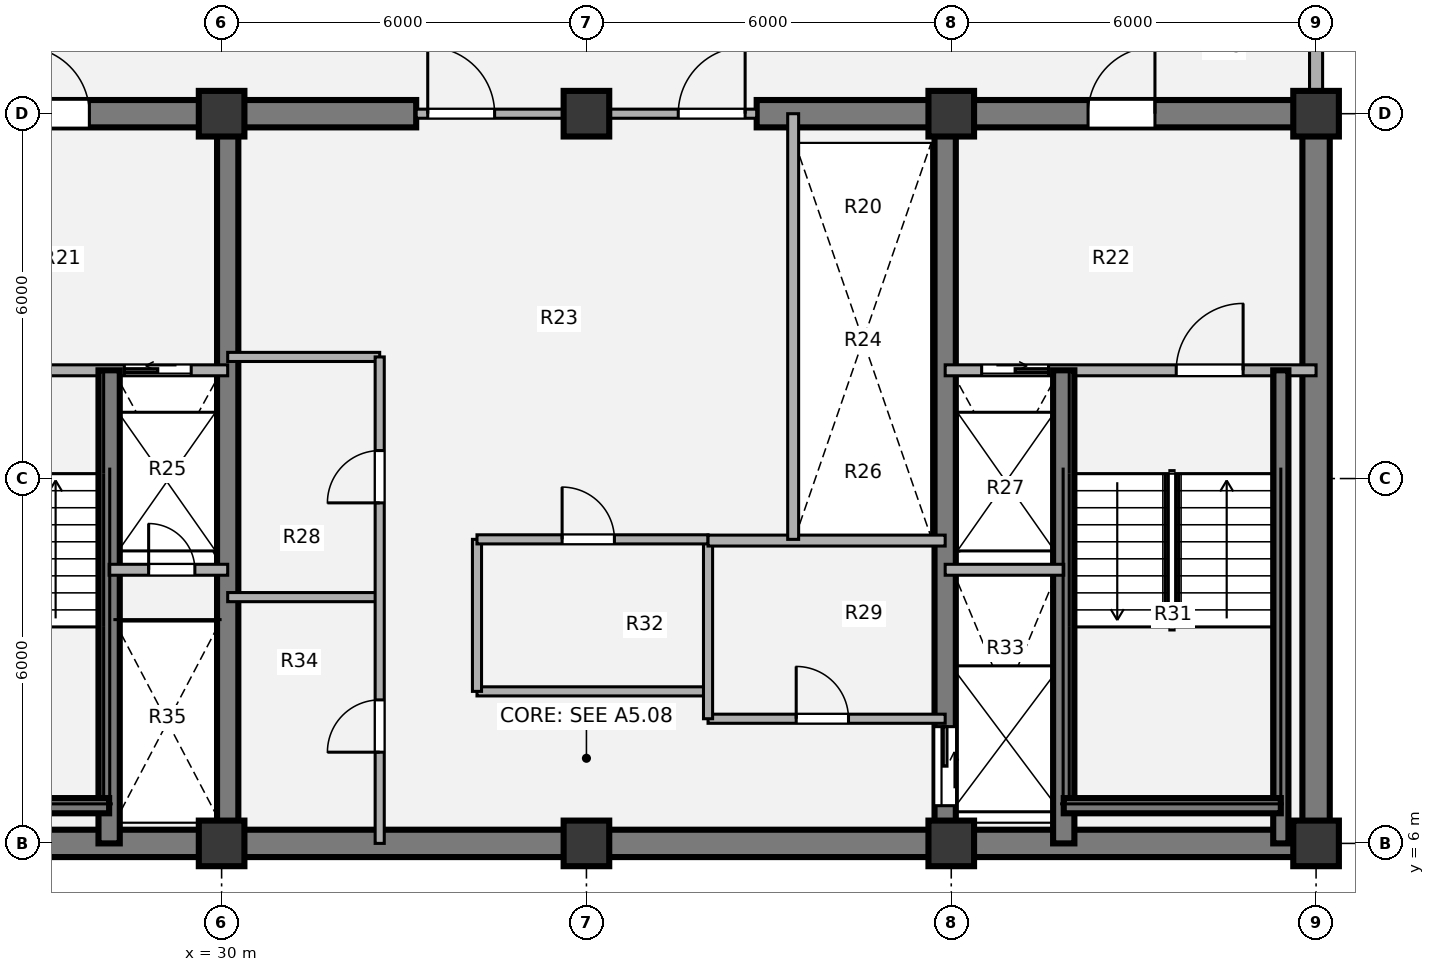
"""IFC4 building model, lengths in metres.
Left out: names, types, materials, properties, quantities, classifications, styles, units other than length and angle.
Written with IfcOpenShell. Run it as: python <this file> out.ifc"""

import sys

from ifc_helpers import new_model, si_unit, direction, frame, frame_2d, origin, origin_2d, place, context, subcontext, project, spatial, rectangle, extrude, source, transform, mapped, element, fill, save


model = new_model("IFC4")
c1 = context("Model", 3, precision=1e-05, world=origin(), true_north=direction((0.0, 1.0)))
c2 = subcontext(c1, "Body", "Model", "MODEL_VIEW")
j1 = project(units=[si_unit("LENGTHUNIT", "METRE"), si_unit("PLANEANGLEUNIT", "RADIAN")], contexts=[c1])
p1 = place(None, origin())
s1 = spatial("IfcSite", under=j1, at=p1, CompositionType="ELEMENT")
p2 = place(p1, origin())
s2 = spatial("IfcBuilding", under=s1, at=p2, CompositionType="ELEMENT")
p3 = place(p2, frame((0.0, 0.0, 182.88)))
s3 = spatial("IfcBuildingStorey", under=s2, at=p3, CompositionType="ELEMENT", Elevation=182.88)
m1 = source(origin(), c2, "Body", "SweptSolid", [
    extrude(rectangle(XDim=0.75, YDim=0.75, at=origin_2d()), origin(), (0.0, 0.0, 1.0), 3.78),
])
for number, where, z_axis, x_axis in (
    (1, (30.0, 6.0, 0.0), (0.0, 0.0, 1.0), (1.0, 0.0, 0.0)),
    (2, (36.0, 6.0, 0.0), (0.0, 0.0, 1.0), (1.0, 0.0, 0.0)),
    (3, (42.0, 6.0, 0.0), (0.0, 0.0, 1.0), (1.0, 0.0, 0.0)),
    (4, (48.0, 6.0, 0.0), (0.0, 0.0, 1.0), (1.0, 0.0, 0.0)),
    (5, (30.0, 18.0, 0.0), (0.0, 0.0, 1.0), (1.0, 0.0, 0.0)),
    (6, (36.0, 18.0, 0.0), (0.0, 0.0, 1.0), (1.0, 0.0, 0.0)),
    (7, (42.0, 18.0, 0.0), (0.0, 0.0, 1.0), (1.0, 0.0, 0.0)),
    (8, (48.0, 18.0, 0.0), (0.0, 0.0, 1.0), (1.0, 0.0, 0.0)),
):
    element("IfcColumn", number, at=place(p3, frame(where, z_axis=z_axis, x_axis=x_axis)), inside=s3, PredefinedType="COLUMN", context=c2, shape_type="MappedRepresentation", body=[
        mapped(m1, transform((0.0, 0.0, 0.0), x_axis=(1.0, 0.0, 0.0), y_axis=(0.0, 1.0, 0.0), z_axis=(0.0, 0.0, 1.0), scale=1.0)),
    ])
p4 = place(p3, frame((48.225, 6.0, 0.0), z_axis=(0.0, 0.0, 1.0), x_axis=(-1.0, 0.0, 0.0)))
e9 = element("IfcWall", 9, at=p4, inside=s3, PredefinedType="SHEAR", context=c2, shape_type="SweptSolid", body=[
    extrude(rectangle(XDim=24.45, YDim=0.45, at=frame_2d((12.225, 0.0))), origin(), (0.0, 0.0, 1.0), 3.78),
])
p5 = place(p3, frame((48.0, 18.0, 0.0), z_axis=(0.0, 0.0, 1.0), x_axis=(0.0, -1.0, 0.0)))
e10 = element("IfcWall", 10, at=p5, inside=s3, PredefinedType="SHEAR", context=c2, shape_type="SweptSolid", body=[
    extrude(rectangle(XDim=12.0, YDim=0.45, at=frame_2d((6.0, 0.0))), origin(), (0.0, 0.0, 1.0), 3.78),
])
p6 = place(p3, frame((23.775, 18.0, 0.0), z_axis=(0.0, 0.0, 1.0), x_axis=(1.0, 0.0, 0.0)))
e11 = element("IfcWall", 11, at=p6, inside=s3, PredefinedType="SHEAR", context=c2, shape_type="SweptSolid", body=[
    extrude(rectangle(XDim=9.425, YDim=0.45, at=frame_2d((4.712, 0.0))), origin(), (0.0, 0.0, 1.0), 3.78),
])
p7 = place(p6, frame((2.95, 0.0, 0.0)))
e12 = element("IfcOpeningElement", 12, at=p7, cuts=e11, PredefinedType="OPENING", context=c2, shape_type="SweptSolid", body=[
    extrude(rectangle(XDim=1.1, YDim=2.1, at=origin_2d()), frame((0.55, 0.235, 1.05), z_axis=(0.0, -1.0, 0.0), x_axis=(1.0, 0.0, 0.0)), (0.0, 0.0, 1.0), 0.47),
])
p8 = place(p3, frame((38.8, 18.0, 0.0), z_axis=(0.0, 0.0, 1.0), x_axis=(1.0, 0.0, 0.0)))
e13 = element("IfcWall", 13, at=p8, inside=s3, PredefinedType="SHEAR", context=c2, shape_type="SweptSolid", body=[
    extrude(rectangle(XDim=9.425, YDim=0.45, at=frame_2d((4.712, 0.0))), origin(), (0.0, 0.0, 1.0), 3.78),
])
p9 = place(p8, frame((5.45, 0.0, 0.0)))
e14 = element("IfcOpeningElement", 14, at=p9, cuts=e13, PredefinedType="OPENING", context=c2, shape_type="SweptSolid", body=[
    extrude(rectangle(XDim=1.1, YDim=2.1, at=origin_2d()), frame((0.55, 0.235, 1.05), z_axis=(0.0, -1.0, 0.0), x_axis=(1.0, 0.0, 0.0)), (0.0, 0.0, 1.0), 0.47),
])
p10 = place(p3, frame((30.1, 6.0, 0.0), z_axis=(0.0, 0.0, 1.0), x_axis=(0.0, 1.0, 0.0)))
e15 = element("IfcWall", 15, at=p10, inside=s3, PredefinedType="SHEAR", context=c2, shape_type="SweptSolid", body=[
    extrude(rectangle(XDim=12.0, YDim=0.35, at=frame_2d((6.0, 0.0))), origin(), (0.0, 0.0, 1.0), 3.78),
])
p11 = place(p3, frame((41.9, 18.0, 0.0), z_axis=(0.0, 0.0, 1.0), x_axis=(0.0, -1.0, 0.0)))
e16 = element("IfcWall", 16, at=p11, inside=s3, PredefinedType="SHEAR", context=c2, shape_type="SweptSolid", body=[
    extrude(rectangle(XDim=12.0, YDim=0.35, at=frame_2d((6.0, 0.0))), origin(), (0.0, 0.0, 1.0), 3.78),
])
p12 = place(p11, frame((10.08, 0.0, 0.0)))
e17 = element("IfcOpeningElement", 17, at=p12, cuts=e16, PredefinedType="OPENING", context=c2, shape_type="SweptSolid", body=[
    extrude(rectangle(XDim=1.3, YDim=2.1, at=origin_2d()), frame((0.65, 0.185, 1.05), z_axis=(0.0, -1.0, 0.0), x_axis=(1.0, 0.0, 0.0)), (0.0, 0.0, 1.0), 0.37),
])
p13 = place(p3, frame((48.0, 21.05, 0.0), z_axis=(0.0, 0.0, 1.0), x_axis=(0.0, -1.0, 0.0)))
e18 = element("IfcWall", 18, at=p13, inside=s3, PredefinedType="SOLIDWALL", context=c2, shape_type="SweptSolid", body=[
    extrude(rectangle(XDim=2.695, YDim=0.215, at=frame_2d((1.348, 0.0))), origin(), (0.0, 0.0, 1.0), 2.718),
])
p14 = place(p3, frame((30.1, 14.0, 0.0), z_axis=(0.0, 0.0, 1.0), x_axis=(1.0, 0.0, 0.0)))
e19 = element("IfcWall", 19, at=p14, inside=s3, PredefinedType="PARTITIONING", context=c2, shape_type="SweptSolid", body=[
    extrude(rectangle(XDim=2.5, YDim=0.15, at=frame_2d((1.25, 0.0))), origin(), (0.0, 0.0, 1.0), 3.5),
])
p15 = place(p3, frame((34.2, 8.5, 0.0), z_axis=(0.0, 0.0, 1.0), x_axis=(1.0, 0.0, 0.0)))
e20 = element("IfcWall", 20, at=p15, inside=s3, PredefinedType="PARTITIONING", context=c2, shape_type="SweptSolid", body=[
    extrude(rectangle(XDim=3.8, YDim=0.15, at=frame_2d((1.9, 0.0))), origin(), (0.0, 0.0, 1.0), 3.5),
])
p16 = place(p3, frame((38.0, 8.05, 0.0), z_axis=(0.0, 0.0, 1.0), x_axis=(1.0, 0.0, 0.0)))
e21 = element("IfcWall", 21, at=p16, inside=s3, PredefinedType="PARTITIONING", context=c2, shape_type="SweptSolid", body=[
    extrude(rectangle(XDim=3.9, YDim=0.15, at=frame_2d((1.95, 0.0))), origin(), (0.0, 0.0, 1.0), 3.5),
])
p17 = place(p16, frame((1.45, 0.0, 0.0)))
e22 = element("IfcOpeningElement", 22, at=p17, cuts=e21, PredefinedType="OPENING", context=c2, shape_type="SweptSolid", body=[
    extrude(rectangle(XDim=0.86, YDim=2.1, at=origin_2d()), frame((0.43, 0.085, 1.05), z_axis=(0.0, -1.0, 0.0), x_axis=(1.0, 0.0, 0.0)), (0.0, 0.0, 1.0), 0.17),
])
p18 = place(p3, frame((34.2, 8.5, 0.0), z_axis=(0.0, 0.0, 1.0), x_axis=(0.0, 1.0, 0.0)))
e23 = element("IfcWall", 23, at=p18, inside=s3, PredefinedType="PARTITIONING", context=c2, shape_type="SweptSolid", body=[
    extrude(rectangle(XDim=2.5, YDim=0.15, at=frame_2d((1.25, 0.0))), origin(), (0.0, 0.0, 1.0), 3.5),
])
p19 = place(p3, frame((38.0, 8.05, 0.0), z_axis=(0.0, 0.0, 1.0), x_axis=(0.0, 1.0, 0.0)))
e24 = element("IfcWall", 24, at=p19, inside=s3, PredefinedType="PARTITIONING", context=c2, shape_type="SweptSolid", body=[
    extrude(rectangle(XDim=2.95, YDim=0.15, at=frame_2d((1.475, 0.0))), origin(), (0.0, 0.0, 1.0), 3.5),
])
p20 = place(p3, frame((34.2, 11.0, 0.0), z_axis=(0.0, 0.0, 1.0), x_axis=(1.0, 0.0, 0.0)))
e25 = element("IfcWall", 25, at=p20, inside=s3, PredefinedType="PARTITIONING", context=c2, shape_type="SweptSolid", body=[
    extrude(rectangle(XDim=3.8, YDim=0.15, at=frame_2d((1.9, 0.0))), origin(), (0.0, 0.0, 1.0), 3.5),
])
p21 = place(p20, frame((1.4, 0.0, 0.0)))
e26 = element("IfcOpeningElement", 26, at=p21, cuts=e25, PredefinedType="OPENING", context=c2, shape_type="SweptSolid", body=[
    extrude(rectangle(XDim=0.86, YDim=2.1, at=origin_2d()), frame((0.43, 0.085, 1.05), z_axis=(0.0, -1.0, 0.0), x_axis=(1.0, 0.0, 0.0)), (0.0, 0.0, 1.0), 0.17),
])
p22 = place(p3, frame((38.0, 10.98, 0.0), z_axis=(0.0, 0.0, 1.0), x_axis=(1.0, 0.0, 0.0)))
e27 = element("IfcWall", 27, at=p22, inside=s3, PredefinedType="PARTITIONING", context=c2, shape_type="SweptSolid", body=[
    extrude(rectangle(XDim=3.9, YDim=0.18, at=frame_2d((1.95, 0.0))), origin(), (0.0, 0.0, 1.0), 3.5),
])
p23 = place(p3, frame((39.4, 11.0, 0.0), z_axis=(0.0, 0.0, 1.0), x_axis=(0.0, 1.0, 0.0)))
e28 = element("IfcWall", 28, at=p23, inside=s3, PredefinedType="PARTITIONING", context=c2, shape_type="SweptSolid", body=[
    extrude(rectangle(XDim=7.0, YDim=0.18, at=frame_2d((3.5, 0.0))), origin(), (0.0, 0.0, 1.0), 3.5),
])
p24 = place(p3, frame((30.1, 10.05, 0.0), z_axis=(0.0, 0.0, 1.0), x_axis=(1.0, 0.0, 0.0)))
e29 = element("IfcWall", 29, at=p24, inside=s3, PredefinedType="PARTITIONING", context=c2, shape_type="SweptSolid", body=[
    extrude(rectangle(XDim=2.5, YDim=0.15, at=frame_2d((1.25, 0.0))), origin(), (0.0, 0.0, 1.0), 3.5),
])
p25 = place(p3, frame((32.6, 6.0, 0.0), z_axis=(0.0, 0.0, 1.0), x_axis=(0.0, 1.0, 0.0)))
e30 = element("IfcWall", 30, at=p25, inside=s3, PredefinedType="PARTITIONING", context=c2, shape_type="SweptSolid", body=[
    extrude(rectangle(XDim=8.0, YDim=0.15, at=frame_2d((4.0, 0.0))), origin(), (0.0, 0.0, 1.0), 3.5),
])
p26 = place(p25, frame((1.5, 0.0, 0.0)))
e31 = element("IfcOpeningElement", 31, at=p26, cuts=e30, PredefinedType="OPENING", context=c2, shape_type="SweptSolid", body=[
    extrude(rectangle(XDim=0.86, YDim=2.1, at=origin_2d()), frame((0.43, 0.085, 1.05), z_axis=(0.0, -1.0, 0.0), x_axis=(1.0, 0.0, 0.0)), (0.0, 0.0, 1.0), 0.17),
])
p27 = place(p25, frame((5.6, 0.0, 0.0)))
e32 = element("IfcOpeningElement", 32, at=p27, cuts=e30, PredefinedType="OPENING", context=c2, shape_type="SweptSolid", body=[
    extrude(rectangle(XDim=0.86, YDim=2.1, at=origin_2d()), frame((0.43, 0.085, 1.05), z_axis=(0.0, -1.0, 0.0), x_axis=(1.0, 0.0, 0.0)), (0.0, 0.0, 1.0), 0.17),
])
p28 = place(p3, frame((33.2, 18.0, 0.0), z_axis=(0.0, 0.0, 1.0), x_axis=(1.0, 0.0, 0.0)))
e33 = element("IfcWall", 33, at=p28, inside=s3, PredefinedType="PARTITIONING", context=c2, shape_type="SweptSolid", body=[
    extrude(rectangle(XDim=5.6, YDim=0.15, at=frame_2d((2.8, 0.0))), origin(), (0.0, 0.0, 1.0), 2.515),
])
p29 = place(p28, frame((0.19, 0.0, 0.0)))
e34 = element("IfcOpeningElement", 34, at=p29, cuts=e33, PredefinedType="OPENING", context=c2, shape_type="SweptSolid", body=[
    extrude(rectangle(XDim=1.1, YDim=2.1, at=origin_2d()), frame((0.55, 0.085, 1.05), z_axis=(0.0, -1.0, 0.0), x_axis=(1.0, 0.0, 0.0)), (0.0, 0.0, 1.0), 0.17),
])
p30 = place(p28, frame((4.31, 0.0, 0.0)))
e35 = element("IfcOpeningElement", 35, at=p30, cuts=e33, PredefinedType="OPENING", context=c2, shape_type="SweptSolid", body=[
    extrude(rectangle(XDim=1.1, YDim=2.1, at=origin_2d()), frame((0.55, 0.085, 1.05), z_axis=(0.0, -1.0, 0.0), x_axis=(1.0, 0.0, 0.0)), (0.0, 0.0, 1.0), 0.17),
])
p31 = place(p3, frame((24.0, 13.78, 0.0), z_axis=(0.0, 0.0, 1.0), x_axis=(1.0, 0.0, 0.0)))
e36 = element("IfcWall", 36, at=p31, inside=s3, PredefinedType="PARTITIONING", context=c2, shape_type="SweptSolid", body=[
    extrude(rectangle(XDim=6.1, YDim=0.18, at=frame_2d((3.05, 0.0))), origin(), (0.0, 0.0, 1.0), 3.5),
])
p32 = place(p31, frame((1.15, 0.0, 0.0)))
e37 = element("IfcOpeningElement", 37, at=p32, cuts=e36, PredefinedType="OPENING", context=c2, shape_type="SweptSolid", body=[
    extrude(rectangle(XDim=1.1, YDim=2.1, at=origin_2d()), frame((0.55, 0.1, 1.05), z_axis=(0.0, -1.0, 0.0), x_axis=(1.0, 0.0, 0.0)), (0.0, 0.0, 1.0), 0.2),
])
p33 = place(p31, frame((4.4, 0.0, 0.0)))
e38 = element("IfcOpeningElement", 38, at=p33, cuts=e36, PredefinedType="OPENING", context=c2, shape_type="SweptSolid", body=[
    extrude(rectangle(XDim=1.1, YDim=2.1, at=origin_2d()), frame((0.55, 0.1, 1.05), z_axis=(0.0, -1.0, 0.0), x_axis=(1.0, 0.0, 0.0)), (0.0, 0.0, 1.0), 0.2),
])
p34 = place(p3, frame((28.15, 6.0, 0.0), z_axis=(0.0, 0.0, 1.0), x_axis=(0.0, 1.0, 0.0)))
e39 = element("IfcWall", 39, at=p34, inside=s3, PredefinedType="SHEAR", context=c2, shape_type="SweptSolid", body=[
    extrude(rectangle(XDim=7.78, YDim=0.35, at=frame_2d((3.89, 0.0))), origin(), (0.0, 0.0, 1.0), 3.85),
])
p35 = place(p3, frame((24.58, 6.62, 0.0), z_axis=(0.0, 0.0, 1.0), x_axis=(1.0, 0.0, 0.0)))
e40 = element("IfcWall", 40, at=p35, inside=s3, PredefinedType="SHEAR", context=c2, shape_type="SweptSolid", body=[
    extrude(rectangle(XDim=3.57, YDim=0.25, at=frame_2d((1.785, 0.0))), origin(), (0.0, 0.0, 1.0), 3.85),
])
p36 = place(p3, frame((28.15, 10.5, 0.0), z_axis=(0.0, 0.0, 1.0), x_axis=(1.0, 0.0, 0.0)))
e41 = element("IfcWall", 41, at=p36, inside=s3, PredefinedType="PARTITIONING", context=c2, shape_type="SweptSolid", body=[
    extrude(rectangle(XDim=1.95, YDim=0.18, at=frame_2d((0.975, 0.0))), origin(), (0.0, 0.0, 1.0), 3.5),
])
p37 = place(p36, frame((0.65, 0.0, 0.0)))
e42 = element("IfcOpeningElement", 42, at=p37, cuts=e41, PredefinedType="OPENING", context=c2, shape_type="SweptSolid", body=[
    extrude(rectangle(XDim=0.76, YDim=2.05, at=origin_2d()), frame((0.38, 0.1, 1.025), z_axis=(0.0, -1.0, 0.0), x_axis=(1.0, 0.0, 0.0)), (0.0, 0.0, 1.0), 0.2),
])
p38 = place(p3, frame((41.9, 13.78, 0.0), z_axis=(0.0, 0.0, 1.0), x_axis=(1.0, 0.0, 0.0)))
e43 = element("IfcWall", 43, at=p38, inside=s3, PredefinedType="PARTITIONING", context=c2, shape_type="SweptSolid", body=[
    extrude(rectangle(XDim=6.1, YDim=0.18, at=frame_2d((3.05, 0.0))), origin(), (0.0, 0.0, 1.0), 3.5),
])
p39 = place(p38, frame((0.6, 0.0, 0.0)))
e44 = element("IfcOpeningElement", 44, at=p39, cuts=e43, PredefinedType="OPENING", context=c2, shape_type="SweptSolid", body=[
    extrude(rectangle(XDim=1.1, YDim=2.1, at=origin_2d()), frame((0.55, 0.1, 1.05), z_axis=(0.0, -1.0, 0.0), x_axis=(1.0, 0.0, 0.0)), (0.0, 0.0, 1.0), 0.2),
])
p40 = place(p38, frame((3.8, 0.0, 0.0)))
e45 = element("IfcOpeningElement", 45, at=p40, cuts=e43, PredefinedType="OPENING", context=c2, shape_type="SweptSolid", body=[
    extrude(rectangle(XDim=1.1, YDim=2.1, at=origin_2d()), frame((0.55, 0.1, 1.05), z_axis=(0.0, -1.0, 0.0), x_axis=(1.0, 0.0, 0.0)), (0.0, 0.0, 1.0), 0.2),
])
p41 = place(p3, frame((43.85, 6.0, 0.0), z_axis=(0.0, 0.0, 1.0), x_axis=(0.0, 1.0, 0.0)))
e46 = element("IfcWall", 46, at=p41, inside=s3, PredefinedType="SHEAR", context=c2, shape_type="SweptSolid", body=[
    extrude(rectangle(XDim=7.78, YDim=0.35, at=frame_2d((3.89, 0.0))), origin(), (0.0, 0.0, 1.0), 3.85),
])
p42 = place(p3, frame((47.42, 6.0, 0.0), z_axis=(0.0, 0.0, 1.0), x_axis=(0.0, 1.0, 0.0)))
e47 = element("IfcWall", 47, at=p42, inside=s3, PredefinedType="SHEAR", context=c2, shape_type="SweptSolid", body=[
    extrude(rectangle(XDim=7.78, YDim=0.25, at=frame_2d((3.89, 0.0))), origin(), (0.0, 0.0, 1.0), 3.85),
])
p43 = place(p3, frame((43.85, 6.62, 0.0), z_axis=(0.0, 0.0, 1.0), x_axis=(1.0, 0.0, 0.0)))
e48 = element("IfcWall", 48, at=p43, inside=s3, PredefinedType="SHEAR", context=c2, shape_type="SweptSolid", body=[
    extrude(rectangle(XDim=3.57, YDim=0.25, at=frame_2d((1.785, 0.0))), origin(), (0.0, 0.0, 1.0), 3.85),
])
p44 = place(p3, frame((41.9, 10.5, 0.0), z_axis=(0.0, 0.0, 1.0), x_axis=(1.0, 0.0, 0.0)))
e49 = element("IfcWall", 49, at=p44, inside=s3, PredefinedType="PARTITIONING", context=c2, shape_type="SweptSolid", body=[
    extrude(rectangle(XDim=1.95, YDim=0.18, at=frame_2d((0.975, 0.0))), origin(), (0.0, 0.0, 1.0), 3.5),
])
m2 = source(origin(), c2, "Body", "SweptSolid", [
    extrude(rectangle(XDim=0.86, YDim=2.1, at=origin_2d()), frame((0.43, 0.025, 1.05), z_axis=(0.0, -1.0, 0.0), x_axis=(1.0, 0.0, 0.0)), (0.0, 0.0, 1.0), 0.05),
])
p45 = place(p17, origin())
e50 = element("IfcDoor", 50, at=p45, inside=s3, OperationType="SINGLE_SWING_LEFT", PredefinedType="DOOR", context=c2, shape_type="MappedRepresentation", body=[
    mapped(m2, transform((0.0, 0.0, 0.0), x_axis=(1.0, 0.0, 0.0), y_axis=(0.0, 1.0, 0.0), z_axis=(0.0, 0.0, 1.0), scale=1.0)),
])
fill(e22, e50)
p46 = place(p21, origin())
e51 = element("IfcDoor", 51, at=p46, inside=s3, OperationType="SINGLE_SWING_LEFT", PredefinedType="DOOR", context=c2, shape_type="MappedRepresentation", body=[
    mapped(m2, transform((0.0, 0.0, 0.0), x_axis=(1.0, 0.0, 0.0), y_axis=(0.0, 1.0, 0.0), z_axis=(0.0, 0.0, 1.0), scale=1.0)),
])
fill(e26, e51)
p47 = place(p26, origin())
e52 = element("IfcDoor", 52, at=p47, inside=s3, OperationType="SINGLE_SWING_LEFT", PredefinedType="DOOR", context=c2, shape_type="MappedRepresentation", body=[
    mapped(m2, transform((0.0, 0.0, 0.0), x_axis=(1.0, 0.0, 0.0), y_axis=(0.0, 1.0, 0.0), z_axis=(0.0, 0.0, 1.0), scale=1.0)),
])
fill(e31, e52)
p48 = place(p27, origin())
e53 = element("IfcDoor", 53, at=p48, inside=s3, OperationType="SINGLE_SWING_LEFT", PredefinedType="DOOR", context=c2, shape_type="MappedRepresentation", body=[
    mapped(m2, transform((0.0, 0.0, 0.0), x_axis=(1.0, 0.0, 0.0), y_axis=(0.0, 1.0, 0.0), z_axis=(0.0, 0.0, 1.0), scale=1.0)),
])
fill(e32, e53)
m3 = source(origin(), c2, "Body", "SweptSolid", [
    extrude(rectangle(XDim=1.1, YDim=2.1, at=origin_2d()), frame((0.55, 0.025, 1.05), z_axis=(0.0, -1.0, 0.0), x_axis=(1.0, 0.0, 0.0)), (0.0, 0.0, 1.0), 0.05),
])
p49 = place(p29, origin())
e54 = element("IfcDoor", 54, at=p49, inside=s3, OperationType="SINGLE_SWING_LEFT", PredefinedType="DOOR", context=c2, shape_type="MappedRepresentation", body=[
    mapped(m3, transform((0.0, 0.0, 0.0), x_axis=(1.0, 0.0, 0.0), y_axis=(0.0, 1.0, 0.0), z_axis=(0.0, 0.0, 1.0), scale=1.0)),
])
fill(e34, e54)
p50 = place(p30, origin())
e55 = element("IfcDoor", 55, at=p50, inside=s3, OperationType="SINGLE_SWING_RIGHT", PredefinedType="DOOR", context=c2, shape_type="MappedRepresentation", body=[
    mapped(m3, transform((0.0, 0.0, 0.0), x_axis=(1.0, 0.0, 0.0), y_axis=(0.0, 1.0, 0.0), z_axis=(0.0, 0.0, 1.0), scale=1.0)),
])
fill(e35, e55)
m4 = source(origin(), c2, "Body", "SweptSolid", [
    extrude(rectangle(XDim=1.1, YDim=2.1, at=origin_2d()), frame((0.55, 0.025, 1.05), z_axis=(0.0, -1.0, 0.0), x_axis=(1.0, 0.0, 0.0)), (0.0, 0.0, 1.0), 0.05),
])
p51 = place(p33, origin())
e56 = element("IfcDoor", 56, at=p51, inside=s3, OperationType="SLIDING_TO_LEFT", PredefinedType="DOOR", context=c2, shape_type="MappedRepresentation", body=[
    mapped(m4, transform((0.0, 0.0, 0.0), x_axis=(1.0, 0.0, 0.0), y_axis=(0.0, 1.0, 0.0), z_axis=(0.0, 0.0, 1.0), scale=1.0)),
])
fill(e38, e56)
m5 = source(origin(), c2, "Body", "SweptSolid", [
    extrude(rectangle(XDim=0.76, YDim=2.05, at=origin_2d()), frame((0.38, 0.025, 1.025), z_axis=(0.0, -1.0, 0.0), x_axis=(1.0, 0.0, 0.0)), (0.0, 0.0, 1.0), 0.05),
])
p52 = place(p37, origin())
e57 = element("IfcDoor", 57, at=p52, inside=s3, OperationType="SINGLE_SWING_LEFT", PredefinedType="DOOR", context=c2, shape_type="MappedRepresentation", body=[
    mapped(m5, transform((0.0, 0.0, 0.0), x_axis=(1.0, 0.0, 0.0), y_axis=(0.0, 1.0, 0.0), z_axis=(0.0, 0.0, 1.0), scale=1.0)),
])
fill(e42, e57)
p53 = place(p39, origin())
e58 = element("IfcDoor", 58, at=p53, inside=s3, OperationType="SLIDING_TO_RIGHT", PredefinedType="DOOR", context=c2, shape_type="MappedRepresentation", body=[
    mapped(m4, transform((0.0, 0.0, 0.0), x_axis=(1.0, 0.0, 0.0), y_axis=(0.0, 1.0, 0.0), z_axis=(0.0, 0.0, 1.0), scale=1.0)),
])
fill(e44, e58)
m6 = source(origin(), c2, "Body", "SweptSolid", [
    extrude(rectangle(XDim=1.1, YDim=2.1, at=origin_2d()), frame((0.55, 0.025, 1.05), z_axis=(0.0, -1.0, 0.0), x_axis=(1.0, 0.0, 0.0)), (0.0, 0.0, 1.0), 0.05),
])
p54 = place(p40, origin())
e59 = element("IfcDoor", 59, at=p54, inside=s3, OperationType="SINGLE_SWING_RIGHT", PredefinedType="DOOR", context=c2, shape_type="MappedRepresentation", body=[
    mapped(m6, transform((0.0, 0.0, 0.0), x_axis=(1.0, 0.0, 0.0), y_axis=(0.0, 1.0, 0.0), z_axis=(0.0, 0.0, 1.0), scale=1.0)),
])
fill(e45, e59)
m7 = source(origin(), c2, "Body", "SweptSolid", [
    extrude(rectangle(XDim=1.3, YDim=2.1, at=origin_2d()), frame((0.65, 0.025, 1.05), z_axis=(0.0, -1.0, 0.0), x_axis=(1.0, 0.0, 0.0)), (0.0, 0.0, 1.0), 0.05),
])
p55 = place(p12, origin())
e60 = element("IfcDoor", 60, at=p55, inside=s3, OperationType="SLIDING_TO_LEFT", PredefinedType="DOOR", context=c2, shape_type="MappedRepresentation", body=[
    mapped(m7, transform((0.0, 0.0, 0.0), x_axis=(1.0, 0.0, 0.0), y_axis=(0.0, 1.0, 0.0), z_axis=(0.0, 0.0, 1.0), scale=1.0)),
])
fill(e17, e60)
p56 = place(p7, origin())
e61 = element("IfcDoor", 61, at=p56, inside=s3, OperationType="SINGLE_SWING_LEFT", PredefinedType="DOOR", context=c2, shape_type="MappedRepresentation", body=[
    mapped(m3, transform((0.0, 0.0, 0.0), x_axis=(1.0, 0.0, 0.0), y_axis=(0.0, 1.0, 0.0), z_axis=(0.0, 0.0, 1.0), scale=1.0)),
])
fill(e12, e61)
p57 = place(p9, origin())
e62 = element("IfcDoor", 62, at=p57, inside=s3, OperationType="SINGLE_SWING_RIGHT", PredefinedType="DOOR", context=c2, shape_type="MappedRepresentation", body=[
    mapped(m3, transform((0.0, 0.0, 0.0), x_axis=(1.0, 0.0, 0.0), y_axis=(0.0, 1.0, 0.0), z_axis=(0.0, 0.0, 1.0), scale=1.0)),
])
fill(e14, e62)
save(model, sys.argv[1])
